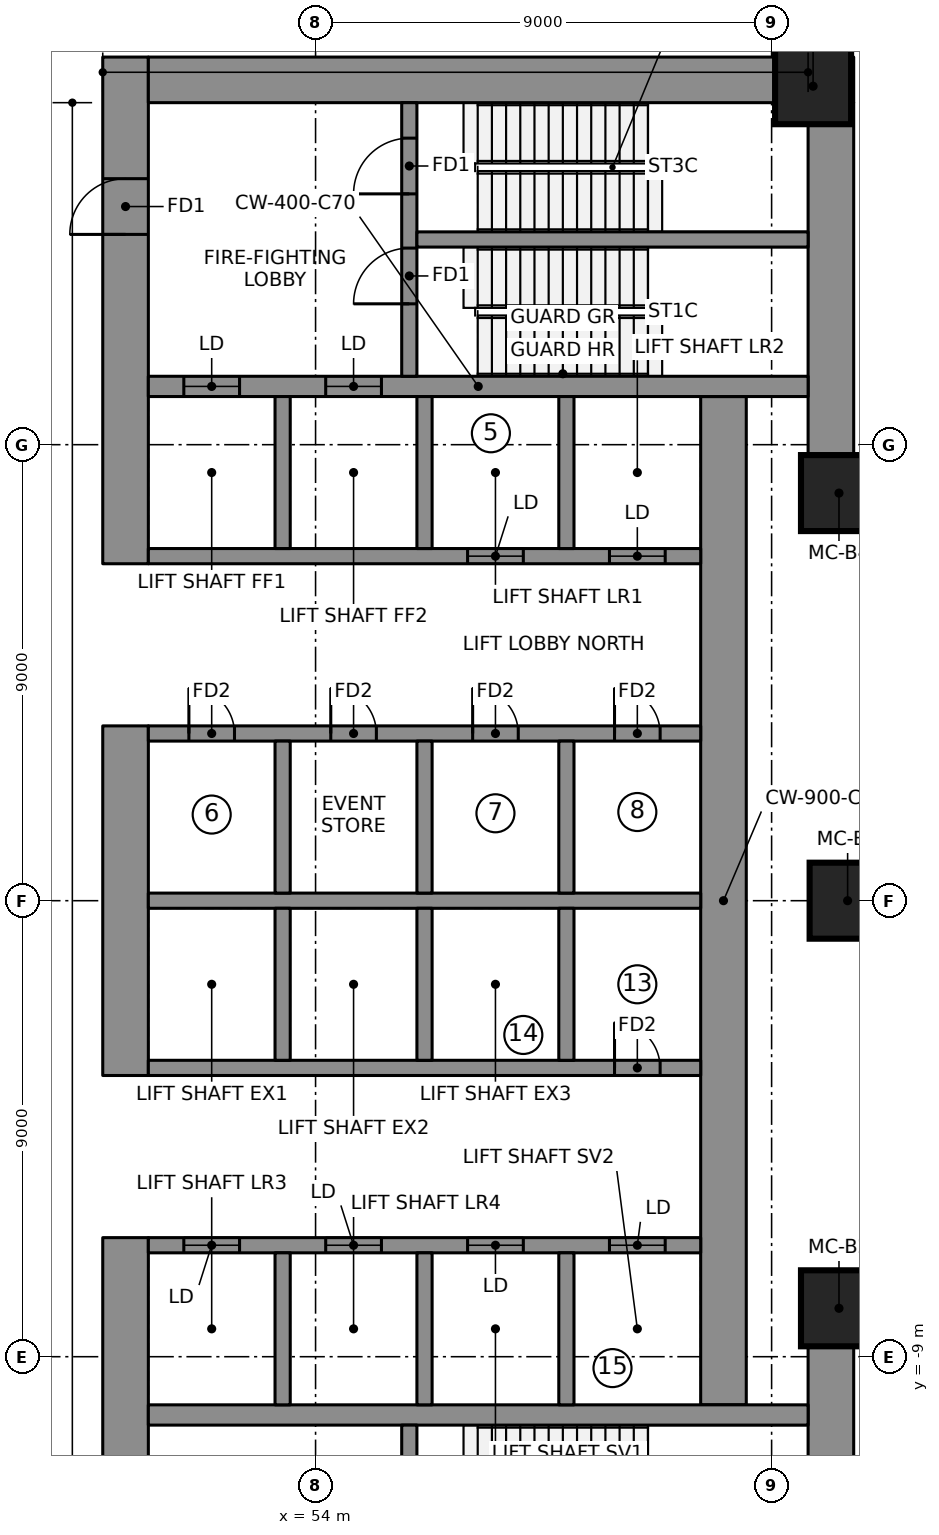
"""IFC4 building model, lengths in metres.
Left out: names, types, materials, properties, quantities, classifications, styles, units other than length and angle.
Written with IfcOpenShell. Run it as: python <this file> out.ifc"""

import sys

from ifc_helpers import new_model, si_unit, direction, frame, frame_2d, origin, origin_2d, place, context, subcontext, project, spatial, rectangle, extrude, element, fill, save


model = new_model("IFC4")
c1 = context("Model", 3, precision=1e-05, world=origin(), true_north=direction((0.0, 1.0)))
c2 = subcontext(c1, "Body", "Model", "MODEL_VIEW")
j1 = project(units=[si_unit("LENGTHUNIT", "METRE"), si_unit("PLANEANGLEUNIT", "RADIAN")], contexts=[c1])
p1 = place(None, origin())
s1 = spatial("IfcSite", under=j1, at=p1, CompositionType="ELEMENT")
p2 = place(p1, origin())
s2 = spatial("IfcBuilding", under=s1, at=p2, CompositionType="ELEMENT")
p3 = place(p2, frame((0.0, 0.0, 125.6)))
s3 = spatial("IfcBuildingStorey", under=s2, at=p3, CompositionType="ELEMENT", Elevation=125.6)
p4 = place(p3, frame((50.25, 6.65, 0.0), z_axis=(0.0, 0.0, 1.0), x_axis=(0.0, 1.0, 0.0)))
e1 = element("IfcWall", 1, at=p4, inside=s3, PredefinedType="SHEAR", context=c2, shape_type="SweptSolid", body=[
    extrude(rectangle(XDim=10.0, YDim=0.9, at=frame_2d((5.0, 0.0))), origin(), (0.0, 0.0, 1.0), 4.6),
])
p5 = place(p4, frame((6.5, 0.0, 0.0)))
e2 = element("IfcOpeningElement", 2, at=p5, cuts=e1, PredefinedType="OPENING", context=c2, shape_type="SweptSolid", body=[
    extrude(rectangle(XDim=1.1, YDim=2.1, at=frame_2d((0.55, 1.05))), frame((0.0, 0.46, 0.0), z_axis=(0.0, -1.0, 0.0), x_axis=(1.0, 0.0, 0.0)), (0.0, 0.0, 1.0), 0.92),
])
p6 = place(p3, frame((50.25, -3.45, 0.0), z_axis=(0.0, 0.0, 1.0), x_axis=(0.0, 1.0, 0.0)))
e3 = element("IfcWall", 3, at=p6, inside=s3, PredefinedType="SHEAR", context=c2, shape_type="SweptSolid", body=[
    extrude(rectangle(XDim=6.9, YDim=0.9, at=frame_2d((3.45, 0.0))), origin(), (0.0, 0.0, 1.0), 4.6),
])
p7 = place(p3, frame((50.25, -16.65, 0.0), z_axis=(0.0, 0.0, 1.0), x_axis=(0.0, 1.0, 0.0)))
e4 = element("IfcWall", 4, at=p7, inside=s3, PredefinedType="SHEAR", context=c2, shape_type="SweptSolid", body=[
    extrude(rectangle(XDim=10.0, YDim=0.9, at=frame_2d((5.0, 0.0))), origin(), (0.0, 0.0, 1.0), 4.6),
])
p8 = place(p7, frame((2.4, 0.0, 0.0)))
e5 = element("IfcOpeningElement", 5, at=p8, cuts=e4, PredefinedType="OPENING", context=c2, shape_type="SweptSolid", body=[
    extrude(rectangle(XDim=1.1, YDim=2.1, at=frame_2d((0.55, 1.05))), frame((0.0, 0.46, 0.0), z_axis=(0.0, -1.0, 0.0), x_axis=(1.0, 0.0, 0.0)), (0.0, 0.0, 1.0), 0.92),
])
p9 = place(p3, frame((50.7, 16.2, 0.0), z_axis=(0.0, 0.0, 1.0), x_axis=(1.0, 0.0, 0.0)))
e6 = element("IfcWall", 6, at=p9, inside=s3, PredefinedType="SHEAR", context=c2, shape_type="SweptSolid", body=[
    extrude(rectangle(XDim=13.92, YDim=0.9, at=frame_2d((6.96, 0.0))), origin(), (0.0, 0.0, 1.0), 4.6),
])
for number, where, z_axis, x_axis in (
    (7, (64.17, 8.745, 0.0), (0.0, 0.0, 1.0), (0.0, 1.0, 0.0)),
    (8, (64.17, -15.75, 0.0), (0.0, 0.0, 1.0), (0.0, 1.0, 0.0)),
):
    element("IfcWall", number, at=place(p3, frame(where, z_axis=z_axis, x_axis=x_axis)), inside=s3, PredefinedType="SHEAR", context=c2, shape_type="SweptSolid", body=[
        extrude(rectangle(XDim=7.005, YDim=0.9, at=frame_2d((3.503, 0.0))), origin(), (0.0, 0.0, 1.0), 4.6),
    ])
p10 = place(p3, frame((62.05, -9.95, 0.0), z_axis=(0.0, 0.0, 1.0), x_axis=(0.0, 1.0, 0.0)))
e9 = element("IfcWall", 9, at=p10, inside=s3, PredefinedType="SHEAR", context=c2, shape_type="SweptSolid", body=[
    extrude(rectangle(XDim=19.9, YDim=0.9, at=frame_2d((9.95, 0.0))), origin(), (0.0, 0.0, 1.0), 4.6),
])
p11 = place(p3, frame((50.7, 10.15, 0.0), z_axis=(0.0, 0.0, 1.0), x_axis=(1.0, 0.0, 0.0)))
e10 = element("IfcWall", 10, at=p11, inside=s3, PredefinedType="SHEAR", context=c2, shape_type="SweptSolid", body=[
    extrude(rectangle(XDim=13.02, YDim=0.4, at=frame_2d((6.51, 0.0))), origin(), (0.0, 0.0, 1.0), 4.6),
])
p12 = place(p11, frame((0.7, 0.0, 0.0)))
e11 = element("IfcOpeningElement", 11, at=p12, cuts=e10, PredefinedType="OPENING", context=c2, shape_type="SweptSolid", body=[
    extrude(rectangle(XDim=1.1, YDim=2.1, at=frame_2d((0.55, 1.05))), frame((0.0, 0.21, 0.0), z_axis=(0.0, -1.0, 0.0), x_axis=(1.0, 0.0, 0.0)), (0.0, 0.0, 1.0), 0.42),
])
p13 = place(p11, frame((3.5, 0.0, 0.0)))
e12 = element("IfcOpeningElement", 12, at=p13, cuts=e10, PredefinedType="OPENING", context=c2, shape_type="SweptSolid", body=[
    extrude(rectangle(XDim=1.1, YDim=2.1, at=frame_2d((0.55, 1.05))), frame((0.0, 0.21, 0.0), z_axis=(0.0, -1.0, 0.0), x_axis=(1.0, 0.0, 0.0)), (0.0, 0.0, 1.0), 0.42),
])
p14 = place(p3, frame((50.7, -10.15, 0.0), z_axis=(0.0, 0.0, 1.0), x_axis=(1.0, 0.0, 0.0)))
e13 = element("IfcWall", 13, at=p14, inside=s3, PredefinedType="SHEAR", context=c2, shape_type="SweptSolid", body=[
    extrude(rectangle(XDim=13.02, YDim=0.4, at=frame_2d((6.51, 0.0))), origin(), (0.0, 0.0, 1.0), 4.6),
])
p15 = place(p3, frame((50.7, 0.0, 0.0), z_axis=(0.0, 0.0, 1.0), x_axis=(1.0, 0.0, 0.0)))
e14 = element("IfcWall", 14, at=p15, inside=s3, PredefinedType="SHEAR", context=c2, shape_type="SweptSolid", body=[
    extrude(rectangle(XDim=10.9, YDim=0.3, at=frame_2d((5.45, 0.0))), origin(), (0.0, 0.0, 1.0), 4.6),
])
p16 = place(p3, frame((50.7, 3.3, 0.0), z_axis=(0.0, 0.0, 1.0), x_axis=(1.0, 0.0, 0.0)))
e15 = element("IfcWall", 15, at=p16, inside=s3, PredefinedType="SHEAR", context=c2, shape_type="SweptSolid", body=[
    extrude(rectangle(XDim=10.9, YDim=0.3, at=frame_2d((5.45, 0.0))), origin(), (0.0, 0.0, 1.0), 4.6),
])
p17 = place(p16, frame((0.8, 0.0, 0.0)))
e16 = element("IfcOpeningElement", 16, at=p17, cuts=e15, PredefinedType="OPENING", context=c2, shape_type="SweptSolid", body=[
    extrude(rectangle(XDim=0.9, YDim=2.1, at=frame_2d((0.45, 1.05))), frame((0.0, 0.16, 0.0), z_axis=(0.0, -1.0, 0.0), x_axis=(1.0, 0.0, 0.0)), (0.0, 0.0, 1.0), 0.32),
])
p18 = place(p16, frame((3.6, 0.0, 0.0)))
e17 = element("IfcOpeningElement", 17, at=p18, cuts=e15, PredefinedType="OPENING", context=c2, shape_type="SweptSolid", body=[
    extrude(rectangle(XDim=0.9, YDim=2.1, at=frame_2d((0.45, 1.05))), frame((0.0, 0.16, 0.0), z_axis=(0.0, -1.0, 0.0), x_axis=(1.0, 0.0, 0.0)), (0.0, 0.0, 1.0), 0.32),
])
p19 = place(p16, frame((6.4, 0.0, 0.0)))
e18 = element("IfcOpeningElement", 18, at=p19, cuts=e15, PredefinedType="OPENING", context=c2, shape_type="SweptSolid", body=[
    extrude(rectangle(XDim=0.9, YDim=2.1, at=frame_2d((0.45, 1.05))), frame((0.0, 0.16, 0.0), z_axis=(0.0, -1.0, 0.0), x_axis=(1.0, 0.0, 0.0)), (0.0, 0.0, 1.0), 0.32),
])
p20 = place(p16, frame((9.2, 0.0, 0.0)))
e19 = element("IfcOpeningElement", 19, at=p20, cuts=e15, PredefinedType="OPENING", context=c2, shape_type="SweptSolid", body=[
    extrude(rectangle(XDim=0.9, YDim=2.1, at=frame_2d((0.45, 1.05))), frame((0.0, 0.16, 0.0), z_axis=(0.0, -1.0, 0.0), x_axis=(1.0, 0.0, 0.0)), (0.0, 0.0, 1.0), 0.32),
])
p21 = place(p3, frame((50.7, 6.8, 0.0), z_axis=(0.0, 0.0, 1.0), x_axis=(1.0, 0.0, 0.0)))
e20 = element("IfcWall", 20, at=p21, inside=s3, PredefinedType="SHEAR", context=c2, shape_type="SweptSolid", body=[
    extrude(rectangle(XDim=10.9, YDim=0.3, at=frame_2d((5.45, 0.0))), origin(), (0.0, 0.0, 1.0), 4.6),
])
p22 = place(p21, frame((6.3, 0.0, 0.0)))
e21 = element("IfcOpeningElement", 21, at=p22, cuts=e20, PredefinedType="OPENING", context=c2, shape_type="SweptSolid", body=[
    extrude(rectangle(XDim=1.1, YDim=2.1, at=frame_2d((0.55, 1.05))), frame((0.0, 0.16, 0.0), z_axis=(0.0, -1.0, 0.0), x_axis=(1.0, 0.0, 0.0)), (0.0, 0.0, 1.0), 0.32),
])
p23 = place(p21, frame((9.1, 0.0, 0.0)))
e22 = element("IfcOpeningElement", 22, at=p23, cuts=e20, PredefinedType="OPENING", context=c2, shape_type="SweptSolid", body=[
    extrude(rectangle(XDim=1.1, YDim=2.1, at=frame_2d((0.55, 1.05))), frame((0.0, 0.16, 0.0), z_axis=(0.0, -1.0, 0.0), x_axis=(1.0, 0.0, 0.0)), (0.0, 0.0, 1.0), 0.32),
])
for number, where, z_axis, x_axis in (
    (23, (53.35, 0.15, 0.0), (0.0, 0.0, 1.0), (0.0, 1.0, 0.0)),
    (24, (53.35, 6.95, 0.0), (0.0, 0.0, 1.0), (0.0, 1.0, 0.0)),
    (25, (56.15, 0.15, 0.0), (0.0, 0.0, 1.0), (0.0, 1.0, 0.0)),
    (26, (56.15, 6.95, 0.0), (0.0, 0.0, 1.0), (0.0, 1.0, 0.0)),
    (27, (58.95, 0.15, 0.0), (0.0, 0.0, 1.0), (0.0, 1.0, 0.0)),
    (28, (58.95, 6.95, 0.0), (0.0, 0.0, 1.0), (0.0, 1.0, 0.0)),
):
    element("IfcWall", number, at=place(p3, frame(where, z_axis=z_axis, x_axis=x_axis)), inside=s3, PredefinedType="SHEAR", context=c2, shape_type="SweptSolid", body=[
        extrude(rectangle(XDim=3.0, YDim=0.3, at=frame_2d((1.5, 0.0))), origin(), (0.0, 0.0, 1.0), 4.6),
    ])
p24 = place(p3, frame((50.7, -3.3, 0.0), z_axis=(0.0, 0.0, 1.0), x_axis=(1.0, 0.0, 0.0)))
e29 = element("IfcWall", 29, at=p24, inside=s3, PredefinedType="SHEAR", context=c2, shape_type="SweptSolid", body=[
    extrude(rectangle(XDim=10.9, YDim=0.3, at=frame_2d((5.45, 0.0))), origin(), (0.0, 0.0, 1.0), 4.6),
])
p25 = place(p24, frame((9.2, 0.0, 0.0)))
e30 = element("IfcOpeningElement", 30, at=p25, cuts=e29, PredefinedType="OPENING", context=c2, shape_type="SweptSolid", body=[
    extrude(rectangle(XDim=0.9, YDim=2.1, at=frame_2d((0.45, 1.05))), frame((0.0, 0.16, 0.0), z_axis=(0.0, -1.0, 0.0), x_axis=(1.0, 0.0, 0.0)), (0.0, 0.0, 1.0), 0.32),
])
p26 = place(p3, frame((50.7, -6.8, 0.0), z_axis=(0.0, 0.0, 1.0), x_axis=(1.0, 0.0, 0.0)))
e31 = element("IfcWall", 31, at=p26, inside=s3, PredefinedType="SHEAR", context=c2, shape_type="SweptSolid", body=[
    extrude(rectangle(XDim=10.9, YDim=0.3, at=frame_2d((5.45, 0.0))), origin(), (0.0, 0.0, 1.0), 4.6),
])
p27 = place(p26, frame((0.7, 0.0, 0.0)))
e32 = element("IfcOpeningElement", 32, at=p27, cuts=e31, PredefinedType="OPENING", context=c2, shape_type="SweptSolid", body=[
    extrude(rectangle(XDim=1.1, YDim=2.1, at=frame_2d((0.55, 1.05))), frame((0.0, 0.16, 0.0), z_axis=(0.0, -1.0, 0.0), x_axis=(1.0, 0.0, 0.0)), (0.0, 0.0, 1.0), 0.32),
])
p28 = place(p26, frame((3.5, 0.0, 0.0)))
e33 = element("IfcOpeningElement", 33, at=p28, cuts=e31, PredefinedType="OPENING", context=c2, shape_type="SweptSolid", body=[
    extrude(rectangle(XDim=1.1, YDim=2.1, at=frame_2d((0.55, 1.05))), frame((0.0, 0.16, 0.0), z_axis=(0.0, -1.0, 0.0), x_axis=(1.0, 0.0, 0.0)), (0.0, 0.0, 1.0), 0.32),
])
p29 = place(p26, frame((6.3, 0.0, 0.0)))
e34 = element("IfcOpeningElement", 34, at=p29, cuts=e31, PredefinedType="OPENING", context=c2, shape_type="SweptSolid", body=[
    extrude(rectangle(XDim=1.1, YDim=2.1, at=frame_2d((0.55, 1.05))), frame((0.0, 0.16, 0.0), z_axis=(0.0, -1.0, 0.0), x_axis=(1.0, 0.0, 0.0)), (0.0, 0.0, 1.0), 0.32),
])
p30 = place(p26, frame((9.1, 0.0, 0.0)))
e35 = element("IfcOpeningElement", 35, at=p30, cuts=e31, PredefinedType="OPENING", context=c2, shape_type="SweptSolid", body=[
    extrude(rectangle(XDim=1.1, YDim=2.1, at=frame_2d((0.55, 1.05))), frame((0.0, 0.16, 0.0), z_axis=(0.0, -1.0, 0.0), x_axis=(1.0, 0.0, 0.0)), (0.0, 0.0, 1.0), 0.32),
])
for number, where, z_axis, x_axis in (
    (36, (53.35, -3.15, 0.0), (0.0, 0.0, 1.0), (0.0, 1.0, 0.0)),
    (37, (53.35, -9.95, 0.0), (0.0, 0.0, 1.0), (0.0, 1.0, 0.0)),
    (38, (56.15, -3.15, 0.0), (0.0, 0.0, 1.0), (0.0, 1.0, 0.0)),
    (39, (56.15, -9.95, 0.0), (0.0, 0.0, 1.0), (0.0, 1.0, 0.0)),
    (40, (58.95, -3.15, 0.0), (0.0, 0.0, 1.0), (0.0, 1.0, 0.0)),
    (41, (58.95, -9.95, 0.0), (0.0, 0.0, 1.0), (0.0, 1.0, 0.0)),
):
    element("IfcWall", number, at=place(p3, frame(where, z_axis=z_axis, x_axis=x_axis)), inside=s3, PredefinedType="SHEAR", context=c2, shape_type="SweptSolid", body=[
        extrude(rectangle(XDim=3.0, YDim=0.3, at=frame_2d((1.5, 0.0))), origin(), (0.0, 0.0, 1.0), 4.6),
    ])
p31 = place(p3, frame((55.85, 10.35, 0.0), z_axis=(0.0, 0.0, 1.0), x_axis=(0.0, 1.0, 0.0)))
e42 = element("IfcWall", 42, at=p31, inside=s3, PredefinedType="SHEAR", context=c2, shape_type="SweptSolid", body=[
    extrude(rectangle(XDim=5.4, YDim=0.3, at=frame_2d((2.7, 0.0))), origin(), (0.0, 0.0, 1.0), 4.6),
])
p32 = place(p31, frame((1.43, 0.0, 0.0)))
e43 = element("IfcOpeningElement", 43, at=p32, cuts=e42, PredefinedType="OPENING", context=c2, shape_type="SweptSolid", body=[
    extrude(rectangle(XDim=1.1, YDim=2.1, at=frame_2d((0.55, 1.05))), frame((0.0, 0.16, 0.0), z_axis=(0.0, -1.0, 0.0), x_axis=(1.0, 0.0, 0.0)), (0.0, 0.0, 1.0), 0.32),
])
p33 = place(p31, frame((3.6, 0.0, 0.0)))
e44 = element("IfcOpeningElement", 44, at=p33, cuts=e42, PredefinedType="OPENING", context=c2, shape_type="SweptSolid", body=[
    extrude(rectangle(XDim=1.1, YDim=2.1, at=frame_2d((0.55, 1.05))), frame((0.0, 0.16, 0.0), z_axis=(0.0, -1.0, 0.0), x_axis=(1.0, 0.0, 0.0)), (0.0, 0.0, 1.0), 0.32),
])
p34 = place(p3, frame((55.85, -15.75, 0.0), z_axis=(0.0, 0.0, 1.0), x_axis=(0.0, 1.0, 0.0)))
e45 = element("IfcWall", 45, at=p34, inside=s3, PredefinedType="SHEAR", context=c2, shape_type="SweptSolid", body=[
    extrude(rectangle(XDim=5.4, YDim=0.3, at=frame_2d((2.7, 0.0))), origin(), (0.0, 0.0, 1.0), 4.6),
])
p35 = place(p34, frame((3.6, 0.0, 0.0)))
e46 = element("IfcOpeningElement", 46, at=p35, cuts=e45, PredefinedType="OPENING", context=c2, shape_type="SweptSolid", body=[
    extrude(rectangle(XDim=1.1, YDim=2.1, at=frame_2d((0.55, 1.05))), frame((0.0, 0.16, 0.0), z_axis=(0.0, -1.0, 0.0), x_axis=(1.0, 0.0, 0.0)), (0.0, 0.0, 1.0), 0.32),
])
p36 = place(p34, frame((0.8, 0.0, 0.0)))
e47 = element("IfcOpeningElement", 47, at=p36, cuts=e45, PredefinedType="OPENING", context=c2, shape_type="SweptSolid", body=[
    extrude(rectangle(XDim=0.9, YDim=2.1, at=frame_2d((0.45, 1.05))), frame((0.0, 0.16, 0.0), z_axis=(0.0, -1.0, 0.0), x_axis=(1.0, 0.0, 0.0)), (0.0, 0.0, 1.0), 0.32),
])
p37 = place(p3, frame((56.0, 13.05, 0.0), z_axis=(0.0, 0.0, 1.0), x_axis=(1.0, 0.0, 0.0)))
e48 = element("IfcWall", 48, at=p37, inside=s3, PredefinedType="SHEAR", context=c2, shape_type="SweptSolid", body=[
    extrude(rectangle(XDim=7.72, YDim=0.3, at=frame_2d((3.86, 0.0))), origin(), (0.0, 0.0, 1.0), 4.6),
])
for number, where, z_axis, x_axis in (
    (49, (64.33, -8.045, 0.0), (0.0, 0.0, 1.0), (1.0, 0.0, 0.0)),
    (50, (64.5, 0.0, 0.0), (0.0, 0.0, 1.0), (1.0, 0.0, 0.0)),
    (51, (64.33, 8.045, 0.0), (0.0, 0.0, 1.0), (1.0, 0.0, 0.0)),
    (52, (63.819, 16.075, 0.0), (0.0, 0.0, 1.0), (1.0, 0.0, 0.0)),
):
    element("IfcColumn", number, at=place(p3, frame(where, z_axis=z_axis, x_axis=x_axis)), inside=s3, PredefinedType="COLUMN", context=c2, shape_type="SweptSolid", body=[
        extrude(rectangle(XDim=1.5, YDim=1.5, at=origin_2d()), origin(), (0.0, 0.0, 1.0), 4.6),
    ])
p38 = place(p12, origin())
e53 = element("IfcDoor", 53, at=p38, inside=s3, OperationType="DOUBLE_DOOR_SLIDING", PredefinedType="DOOR", context=c2, shape_type="SweptSolid", body=[
    extrude(rectangle(XDim=1.1, YDim=2.1, at=frame_2d((0.55, 1.05))), frame((0.0, 0.025, 0.0), z_axis=(0.0, -1.0, 0.0), x_axis=(1.0, 0.0, 0.0)), (0.0, 0.0, 1.0), 0.05),
])
fill(e11, e53)
p39 = place(p13, origin())
e54 = element("IfcDoor", 54, at=p39, inside=s3, OperationType="DOUBLE_DOOR_SLIDING", PredefinedType="DOOR", context=c2, shape_type="SweptSolid", body=[
    extrude(rectangle(XDim=1.1, YDim=2.1, at=frame_2d((0.55, 1.05))), frame((0.0, 0.025, 0.0), z_axis=(0.0, -1.0, 0.0), x_axis=(1.0, 0.0, 0.0)), (0.0, 0.0, 1.0), 0.05),
])
fill(e12, e54)
p40 = place(p22, origin())
e55 = element("IfcDoor", 55, at=p40, inside=s3, OperationType="DOUBLE_DOOR_SLIDING", PredefinedType="DOOR", context=c2, shape_type="SweptSolid", body=[
    extrude(rectangle(XDim=1.1, YDim=2.1, at=frame_2d((0.55, 1.05))), frame((0.0, 0.025, 0.0), z_axis=(0.0, -1.0, 0.0), x_axis=(1.0, 0.0, 0.0)), (0.0, 0.0, 1.0), 0.05),
])
fill(e21, e55)
p41 = place(p23, origin())
e56 = element("IfcDoor", 56, at=p41, inside=s3, OperationType="DOUBLE_DOOR_SLIDING", PredefinedType="DOOR", context=c2, shape_type="SweptSolid", body=[
    extrude(rectangle(XDim=1.1, YDim=2.1, at=frame_2d((0.55, 1.05))), frame((0.0, 0.025, 0.0), z_axis=(0.0, -1.0, 0.0), x_axis=(1.0, 0.0, 0.0)), (0.0, 0.0, 1.0), 0.05),
])
fill(e22, e56)
p42 = place(p27, origin())
e57 = element("IfcDoor", 57, at=p42, inside=s3, OperationType="DOUBLE_DOOR_SLIDING", PredefinedType="DOOR", context=c2, shape_type="SweptSolid", body=[
    extrude(rectangle(XDim=1.1, YDim=2.1, at=frame_2d((0.55, 1.05))), frame((0.0, 0.025, 0.0), z_axis=(0.0, -1.0, 0.0), x_axis=(1.0, 0.0, 0.0)), (0.0, 0.0, 1.0), 0.05),
])
fill(e32, e57)
p43 = place(p28, origin())
e58 = element("IfcDoor", 58, at=p43, inside=s3, OperationType="DOUBLE_DOOR_SLIDING", PredefinedType="DOOR", context=c2, shape_type="SweptSolid", body=[
    extrude(rectangle(XDim=1.1, YDim=2.1, at=frame_2d((0.55, 1.05))), frame((0.0, 0.025, 0.0), z_axis=(0.0, -1.0, 0.0), x_axis=(1.0, 0.0, 0.0)), (0.0, 0.0, 1.0), 0.05),
])
fill(e33, e58)
p44 = place(p29, origin())
e59 = element("IfcDoor", 59, at=p44, inside=s3, OperationType="DOUBLE_DOOR_SLIDING", PredefinedType="DOOR", context=c2, shape_type="SweptSolid", body=[
    extrude(rectangle(XDim=1.1, YDim=2.1, at=frame_2d((0.55, 1.05))), frame((0.0, 0.025, 0.0), z_axis=(0.0, -1.0, 0.0), x_axis=(1.0, 0.0, 0.0)), (0.0, 0.0, 1.0), 0.05),
])
fill(e34, e59)
p45 = place(p30, origin())
e60 = element("IfcDoor", 60, at=p45, inside=s3, OperationType="DOUBLE_DOOR_SLIDING", PredefinedType="DOOR", context=c2, shape_type="SweptSolid", body=[
    extrude(rectangle(XDim=1.1, YDim=2.1, at=frame_2d((0.55, 1.05))), frame((0.0, 0.025, 0.0), z_axis=(0.0, -1.0, 0.0), x_axis=(1.0, 0.0, 0.0)), (0.0, 0.0, 1.0), 0.05),
])
fill(e35, e60)
p46 = place(p32, origin())
e61 = element("IfcDoor", 61, at=p46, inside=s3, OperationType="SINGLE_SWING_RIGHT", PredefinedType="DOOR", context=c2, shape_type="SweptSolid", body=[
    extrude(rectangle(XDim=1.1, YDim=2.1, at=frame_2d((0.55, 1.05))), frame((0.0, 0.025, 0.0), z_axis=(0.0, -1.0, 0.0), x_axis=(1.0, 0.0, 0.0)), (0.0, 0.0, 1.0), 0.05),
])
fill(e43, e61)
p47 = place(p33, origin())
e62 = element("IfcDoor", 62, at=p47, inside=s3, OperationType="SINGLE_SWING_RIGHT", PredefinedType="DOOR", context=c2, shape_type="SweptSolid", body=[
    extrude(rectangle(XDim=1.1, YDim=2.1, at=frame_2d((0.55, 1.05))), frame((0.0, 0.025, 0.0), z_axis=(0.0, -1.0, 0.0), x_axis=(1.0, 0.0, 0.0)), (0.0, 0.0, 1.0), 0.05),
])
fill(e44, e62)
p48 = place(p5, origin())
e63 = element("IfcDoor", 63, at=p48, inside=s3, OperationType="SINGLE_SWING_RIGHT", PredefinedType="DOOR", context=c2, shape_type="SweptSolid", body=[
    extrude(rectangle(XDim=1.1, YDim=2.1, at=frame_2d((0.55, 1.05))), frame((0.0, 0.025, 0.0), z_axis=(0.0, -1.0, 0.0), x_axis=(1.0, 0.0, 0.0)), (0.0, 0.0, 1.0), 0.05),
])
fill(e2, e63)
p49 = place(p17, origin())
e64 = element("IfcDoor", 64, at=p49, inside=s3, OperationType="SINGLE_SWING_LEFT", PredefinedType="DOOR", context=c2, shape_type="SweptSolid", body=[
    extrude(rectangle(XDim=0.9, YDim=2.1, at=frame_2d((0.45, 1.05))), frame((0.0, 0.025, 0.0), z_axis=(0.0, -1.0, 0.0), x_axis=(1.0, 0.0, 0.0)), (0.0, 0.0, 1.0), 0.05),
])
fill(e16, e64)
p50 = place(p18, origin())
e65 = element("IfcDoor", 65, at=p50, inside=s3, OperationType="SINGLE_SWING_LEFT", PredefinedType="DOOR", context=c2, shape_type="SweptSolid", body=[
    extrude(rectangle(XDim=0.9, YDim=2.1, at=frame_2d((0.45, 1.05))), frame((0.0, 0.025, 0.0), z_axis=(0.0, -1.0, 0.0), x_axis=(1.0, 0.0, 0.0)), (0.0, 0.0, 1.0), 0.05),
])
fill(e17, e65)
p51 = place(p19, origin())
e66 = element("IfcDoor", 66, at=p51, inside=s3, OperationType="SINGLE_SWING_LEFT", PredefinedType="DOOR", context=c2, shape_type="SweptSolid", body=[
    extrude(rectangle(XDim=0.9, YDim=2.1, at=frame_2d((0.45, 1.05))), frame((0.0, 0.025, 0.0), z_axis=(0.0, -1.0, 0.0), x_axis=(1.0, 0.0, 0.0)), (0.0, 0.0, 1.0), 0.05),
])
fill(e18, e66)
p52 = place(p20, origin())
e67 = element("IfcDoor", 67, at=p52, inside=s3, OperationType="SINGLE_SWING_LEFT", PredefinedType="DOOR", context=c2, shape_type="SweptSolid", body=[
    extrude(rectangle(XDim=0.9, YDim=2.1, at=frame_2d((0.45, 1.05))), frame((0.0, 0.025, 0.0), z_axis=(0.0, -1.0, 0.0), x_axis=(1.0, 0.0, 0.0)), (0.0, 0.0, 1.0), 0.05),
])
fill(e19, e67)
p53 = place(p25, origin())
e68 = element("IfcDoor", 68, at=p53, inside=s3, OperationType="SINGLE_SWING_LEFT", PredefinedType="DOOR", context=c2, shape_type="SweptSolid", body=[
    extrude(rectangle(XDim=0.9, YDim=2.1, at=frame_2d((0.45, 1.05))), frame((0.0, 0.025, 0.0), z_axis=(0.0, -1.0, 0.0), x_axis=(1.0, 0.0, 0.0)), (0.0, 0.0, 1.0), 0.05),
])
fill(e30, e68)
save(model, sys.argv[1])
